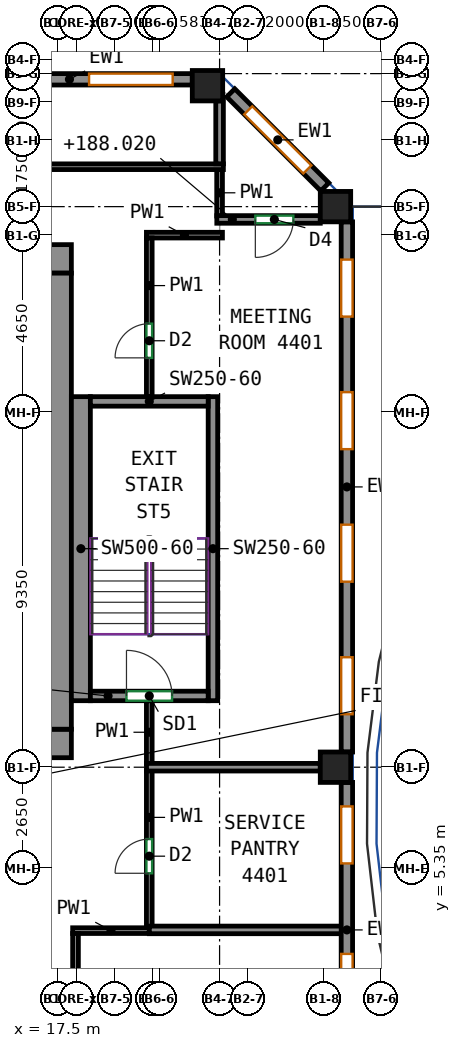
"""IFC4 building model, lengths in metres.
Left out: names, types, materials, properties, quantities, classifications, styles, units other than length and angle.
Written with IfcOpenShell. Run it as: python <this file> out.ifc"""

import sys

from ifc_helpers import new_model, si_unit, direction, frame, frame_2d, origin, origin_2d, place, context, subcontext, project, spatial, rectangle, extrude, source, transform, mapped, element, fill, save


model = new_model("IFC4")
c1 = context("Model", 3, precision=1e-05, world=origin(), true_north=direction((0.0, 1.0)))
c2 = subcontext(c1, "Body", "Model", "MODEL_VIEW")
j1 = project(units=[si_unit("LENGTHUNIT", "METRE"), si_unit("PLANEANGLEUNIT", "RADIAN")], contexts=[c1])
p1 = place(None, origin())
s1 = spatial("IfcSite", under=j1, at=p1, CompositionType="ELEMENT")
p2 = place(p1, origin())
s2 = spatial("IfcBuilding", under=s1, at=p2, CompositionType="ELEMENT")
p3 = place(p2, frame((0.0, 0.0, 185.5)))
s3 = spatial("IfcBuildingStorey", under=s2, at=p3, CompositionType="ELEMENT", Elevation=185.5)
m1 = source(origin(), c2, "Body", "SweptSolid", [
    extrude(rectangle(XDim=0.8, YDim=0.8, at=origin_2d()), origin(), (0.0, 0.0, 1.0), 3.12),
])
for number, where, z_axis, x_axis in (
    (1, (21.432, 25.932, 0.0), (0.0, 0.0, 1.0), (1.0, 0.0, 0.0)),
    (2, (24.8, 8.0, 0.0), (0.0, 0.0, 1.0), (1.0, 0.0, 0.0)),
    (3, (24.8, 22.75, 0.0), (0.0, 0.0, 1.0), (1.0, 0.0, 0.0)),
):
    element("IfcColumn", number, at=place(p3, frame(where, z_axis=z_axis, x_axis=x_axis)), inside=s3, PredefinedType="COLUMN", context=c2, shape_type="MappedRepresentation", body=[
        mapped(m1, transform((0.0, 0.0, 0.0))),
    ])
m2 = source(origin(), c2, "Body", "SweptSolid", [
    extrude(rectangle(XDim=5.38, YDim=0.75, at=frame_2d((2.69, 0.0))), origin(), (0.0, 0.0, 1.0), 3.12),
])
p4 = place(p3, frame((12.47, 8.625, 0.0), z_axis=(0.0, 0.0, 1.0), x_axis=(1.0, 0.0, 0.0)))
e4 = element("IfcWall", 4, at=p4, inside=s3, PredefinedType="SHEAR", context=c2, shape_type="MappedRepresentation", body=[
    mapped(m2, transform((0.0, 0.0, 0.0))),
])
p5 = place(p4, frame((2.18, 0.0, 0.0)))
e5 = element("IfcOpeningElement", 5, at=p5, cuts=e4, PredefinedType="OPENING", context=c2, shape_type="SweptSolid", body=[
    extrude(rectangle(XDim=1.2, YDim=2.1, at=frame_2d((0.6, 1.05))), frame((0.0, 0.385, 0.0), z_axis=(0.0, -1.0, 0.0), x_axis=(1.0, 0.0, 0.0)), (0.0, 0.0, 1.0), 0.77),
])
m3 = source(origin(), c2, "Body", "SweptSolid", [
    extrude(rectangle(XDim=33.6, YDim=0.75, at=frame_2d((16.8, 0.0))), origin(), (0.0, 0.0, 1.0), 3.12),
])
p6 = place(p3, frame((-15.75, 21.375, 0.0), z_axis=(0.0, 0.0, 1.0), x_axis=(1.0, 0.0, 0.0)))
e6 = element("IfcWall", 6, at=p6, inside=s3, PredefinedType="SHEAR", context=c2, shape_type="MappedRepresentation", body=[
    mapped(m3, transform((0.0, 0.0, 0.0))),
])
p7 = place(p6, frame((5.858, 0.0, 0.0)))
e7 = element("IfcOpeningElement", 7, at=p7, cuts=e6, PredefinedType="OPENING", context=c2, shape_type="SweptSolid", body=[
    extrude(rectangle(XDim=0.9, YDim=2.1, at=frame_2d((0.45, 1.05))), frame((0.0, 0.385, 0.0), z_axis=(0.0, -1.0, 0.0), x_axis=(1.0, 0.0, 0.0)), (0.0, 0.0, 1.0), 0.77),
])
p8 = place(p6, frame((10.923, 0.0, 0.0)))
e8 = element("IfcOpeningElement", 8, at=p8, cuts=e6, PredefinedType="OPENING", context=c2, shape_type="SweptSolid", body=[
    extrude(rectangle(XDim=0.9, YDim=2.1, at=frame_2d((0.45, 1.05))), frame((0.0, 0.385, 0.0), z_axis=(0.0, -1.0, 0.0), x_axis=(1.0, 0.0, 0.0)), (0.0, 0.0, 1.0), 0.77),
])
p9 = place(p6, frame((16.055, 0.0, 0.0)))
e9 = element("IfcOpeningElement", 9, at=p9, cuts=e6, PredefinedType="OPENING", context=c2, shape_type="SweptSolid", body=[
    extrude(rectangle(XDim=0.9, YDim=2.1, at=frame_2d((0.45, 1.05))), frame((0.0, 0.385, 0.0), z_axis=(0.0, -1.0, 0.0), x_axis=(1.0, 0.0, 0.0)), (0.0, 0.0, 1.0), 0.77),
])
p10 = place(p6, frame((20.879, 0.0, 0.0)))
e10 = element("IfcOpeningElement", 10, at=p10, cuts=e6, PredefinedType="OPENING", context=c2, shape_type="SweptSolid", body=[
    extrude(rectangle(XDim=0.9, YDim=2.1, at=frame_2d((0.45, 1.05))), frame((0.0, 0.385, 0.0), z_axis=(0.0, -1.0, 0.0), x_axis=(1.0, 0.0, 0.0)), (0.0, 0.0, 1.0), 0.77),
])
p11 = place(p6, frame((26.239, 0.0, 0.0)))
e11 = element("IfcOpeningElement", 11, at=p11, cuts=e6, PredefinedType="OPENING", context=c2, shape_type="SweptSolid", body=[
    extrude(rectangle(XDim=0.9, YDim=2.1, at=frame_2d((0.45, 1.05))), frame((0.0, 0.385, 0.0), z_axis=(0.0, -1.0, 0.0), x_axis=(1.0, 0.0, 0.0)), (0.0, 0.0, 1.0), 0.77),
])
p12 = place(p6, frame((2.275, 0.0, 0.0)))
e12 = element("IfcOpeningElement", 12, at=p12, cuts=e6, PredefinedType="OPENING", context=c2, shape_type="SweptSolid", body=[
    extrude(rectangle(XDim=0.9, YDim=2.1, at=frame_2d((0.45, 1.05))), frame((0.0, 0.385, 0.0), z_axis=(0.0, -1.0, 0.0), x_axis=(1.0, 0.0, 0.0)), (0.0, 0.0, 1.0), 0.77),
])
p13 = place(p6, frame((30.425, 0.0, 0.0)))
e13 = element("IfcOpeningElement", 13, at=p13, cuts=e6, PredefinedType="OPENING", context=c2, shape_type="SweptSolid", body=[
    extrude(rectangle(XDim=0.9, YDim=2.1, at=frame_2d((0.45, 1.05))), frame((0.0, 0.385, 0.0), z_axis=(0.0, -1.0, 0.0), x_axis=(1.0, 0.0, 0.0)), (0.0, 0.0, 1.0), 0.77),
])
m4 = source(origin(), c2, "Body", "SweptSolid", [
    extrude(rectangle(XDim=12.0, YDim=0.75, at=frame_2d((6.0, 0.0))), origin(), (0.0, 0.0, 1.0), 3.12),
])
p14 = place(p3, frame((17.475, 9.0, 0.0), z_axis=(0.0, 0.0, 1.0), x_axis=(0.0, 1.0, 0.0)))
e14 = element("IfcWall", 14, at=p14, inside=s3, PredefinedType="SHEAR", context=c2, shape_type="MappedRepresentation", body=[
    mapped(m4, transform((0.0, 0.0, 0.0))),
])
m5 = source(origin(), c2, "Body", "SweptSolid", [
    extrude(rectangle(XDim=8.0, YDim=0.5, at=frame_2d((4.0, 0.0))), origin(), (0.0, 0.0, 1.0), 3.12),
])
p15 = place(p3, frame((18.1, 9.75, 0.0), z_axis=(0.0, 0.0, 1.0), x_axis=(0.0, 1.0, 0.0)))
e15 = element("IfcWall", 15, at=p15, inside=s3, PredefinedType="SHEAR", context=c2, shape_type="MappedRepresentation", body=[
    mapped(m5, transform((0.0, 0.0, 0.0))),
])
m6 = source(origin(), c2, "Body", "SweptSolid", [
    extrude(rectangle(XDim=8.0, YDim=0.25, at=frame_2d((4.0, 0.0))), origin(), (0.0, 0.0, 1.0), 3.12),
])
p16 = place(p3, frame((21.575, 9.75, 0.0), z_axis=(0.0, 0.0, 1.0), x_axis=(0.0, 1.0, 0.0)))
e16 = element("IfcWall", 16, at=p16, inside=s3, PredefinedType="SHEAR", context=c2, shape_type="MappedRepresentation", body=[
    mapped(m6, transform((0.0, 0.0, 0.0))),
])
m7 = source(origin(), c2, "Body", "SweptSolid", [
    extrude(rectangle(XDim=3.1, YDim=0.25, at=frame_2d((1.55, 0.0))), origin(), (0.0, 0.0, 1.0), 3.12),
])
p17 = place(p3, frame((18.35, 9.875, 0.0), z_axis=(0.0, 0.0, 1.0), x_axis=(1.0, 0.0, 0.0)))
e17 = element("IfcWall", 17, at=p17, inside=s3, PredefinedType="SHEAR", context=c2, shape_type="MappedRepresentation", body=[
    mapped(m7, transform((0.0, 0.0, 0.0))),
])
p18 = place(p17, frame((0.95, 0.0, 0.0)))
e18 = element("IfcOpeningElement", 18, at=p18, cuts=e17, PredefinedType="OPENING", context=c2, shape_type="SweptSolid", body=[
    extrude(rectangle(XDim=1.2, YDim=2.1, at=frame_2d((0.6, 1.05))), frame((0.0, 0.135, 0.0), z_axis=(0.0, -1.0, 0.0), x_axis=(1.0, 0.0, 0.0)), (0.0, 0.0, 1.0), 0.27),
])
p19 = place(p3, frame((18.35, 17.625, 0.0), z_axis=(0.0, 0.0, 1.0), x_axis=(1.0, 0.0, 0.0)))
e19 = element("IfcWall", 19, at=p19, inside=s3, PredefinedType="SHEAR", context=c2, shape_type="MappedRepresentation", body=[
    mapped(m7, transform((0.0, 0.0, 0.0))),
])
m8 = source(origin(), c2, "Body", "SweptSolid", [
    extrude(rectangle(XDim=7.763, YDim=0.3, at=frame_2d((3.881, 0.0))), origin(), (0.0, 0.0, 1.0), 3.12),
])
p20 = place(p3, frame((25.1, -0.163, 0.0), z_axis=(0.0, 0.0, 1.0), x_axis=(0.0, 1.0, 0.0)))
e20 = element("IfcWall", 20, at=p20, inside=s3, PredefinedType="SOLIDWALL", context=c2, shape_type="MappedRepresentation", body=[
    mapped(m8, transform((0.0, 0.0, 0.0))),
])
p21 = place(p20, frame((1.75, 0.0, 0.85)))
e21 = element("IfcOpeningElement", 21, at=p21, cuts=e20, PredefinedType="OPENING", context=c2, shape_type="SweptSolid", body=[
    extrude(rectangle(XDim=1.5, YDim=1.95, at=frame_2d((0.75, 0.975))), frame((0.0, 0.16, 0.0), z_axis=(0.0, -1.0, 0.0), x_axis=(1.0, 0.0, 0.0)), (0.0, 0.0, 1.0), 0.32),
])
p22 = place(p20, frame((5.631, 0.0, 0.85)))
e22 = element("IfcOpeningElement", 22, at=p22, cuts=e20, PredefinedType="OPENING", context=c2, shape_type="SweptSolid", body=[
    extrude(rectangle(XDim=1.5, YDim=1.95, at=frame_2d((0.75, 0.975))), frame((0.0, 0.16, 0.0), z_axis=(0.0, -1.0, 0.0), x_axis=(1.0, 0.0, 0.0)), (0.0, 0.0, 1.0), 0.32),
])
m9 = source(origin(), c2, "Body", "SweptSolid", [
    extrude(rectangle(XDim=13.95, YDim=0.3, at=frame_2d((6.975, 0.0))), origin(), (0.0, 0.0, 1.0), 3.12),
])
p23 = place(p3, frame((25.1, 8.4, 0.0), z_axis=(0.0, 0.0, 1.0), x_axis=(0.0, 1.0, 0.0)))
e23 = element("IfcWall", 23, at=p23, inside=s3, PredefinedType="SOLIDWALL", context=c2, shape_type="MappedRepresentation", body=[
    mapped(m9, transform((0.0, 0.0, 0.0))),
])
p24 = place(p23, frame((0.994, 0.0, 0.85)))
e24 = element("IfcOpeningElement", 24, at=p24, cuts=e23, PredefinedType="OPENING", context=c2, shape_type="SweptSolid", body=[
    extrude(rectangle(XDim=1.5, YDim=1.95, at=frame_2d((0.75, 0.975))), frame((0.0, 0.16, 0.0), z_axis=(0.0, -1.0, 0.0), x_axis=(1.0, 0.0, 0.0)), (0.0, 0.0, 1.0), 0.32),
])
p25 = place(p23, frame((4.481, 0.0, 0.85)))
e25 = element("IfcOpeningElement", 25, at=p25, cuts=e23, PredefinedType="OPENING", context=c2, shape_type="SweptSolid", body=[
    extrude(rectangle(XDim=1.5, YDim=1.95, at=frame_2d((0.75, 0.975))), frame((0.0, 0.16, 0.0), z_axis=(0.0, -1.0, 0.0), x_axis=(1.0, 0.0, 0.0)), (0.0, 0.0, 1.0), 0.32),
])
p26 = place(p23, frame((7.969, 0.0, 0.85)))
e26 = element("IfcOpeningElement", 26, at=p26, cuts=e23, PredefinedType="OPENING", context=c2, shape_type="SweptSolid", body=[
    extrude(rectangle(XDim=1.5, YDim=1.95, at=frame_2d((0.75, 0.975))), frame((0.0, 0.16, 0.0), z_axis=(0.0, -1.0, 0.0), x_axis=(1.0, 0.0, 0.0)), (0.0, 0.0, 1.0), 0.32),
])
p27 = place(p23, frame((11.456, 0.0, 0.85)))
e27 = element("IfcOpeningElement", 27, at=p27, cuts=e23, PredefinedType="OPENING", context=c2, shape_type="SweptSolid", body=[
    extrude(rectangle(XDim=1.5, YDim=1.95, at=frame_2d((0.75, 0.975))), frame((0.0, 0.16, 0.0), z_axis=(0.0, -1.0, 0.0), x_axis=(1.0, 0.0, 0.0)), (0.0, 0.0, 1.0), 0.32),
])
m10 = source(origin(), c2, "Body", "SweptSolid", [
    extrude(rectangle(XDim=3.5, YDim=0.3, at=frame_2d((1.75, 0.0))), origin(), (0.0, 0.0, 1.0), 3.12),
])
p28 = place(p3, frame((24.519, 23.269, 0.0), z_axis=(0.0, 0.0, 1.0), x_axis=(-0.70707190453, 0.707141656123, 0.0)))
e28 = element("IfcWall", 28, at=p28, inside=s3, PredefinedType="SOLIDWALL", context=c2, shape_type="MappedRepresentation", body=[
    mapped(m10, transform((0.0, 0.0, 0.0))),
])
p29 = place(p28, frame((0.65, 0.0, 0.85)))
e29 = element("IfcOpeningElement", 29, at=p29, cuts=e28, PredefinedType="OPENING", context=c2, shape_type="SweptSolid", body=[
    extrude(rectangle(XDim=2.2, YDim=1.95, at=frame_2d((1.1, 0.975))), frame((0.0, 0.16, 0.0), z_axis=(0.0, -1.0, 0.0), x_axis=(1.0, 0.0, 0.0)), (0.0, 0.0, 1.0), 0.32),
])
m11 = source(origin(), c2, "Body", "SweptSolid", [
    extrude(rectangle(XDim=6.465, YDim=0.3, at=frame_2d((3.232, 0.0))), origin(), (0.0, 0.0, 1.0), 3.12),
])
p30 = place(p3, frame((21.032, 26.1, 0.0), z_axis=(0.0, 0.0, 1.0), x_axis=(-1.0, 0.0, 0.0)))
e30 = element("IfcWall", 30, at=p30, inside=s3, PredefinedType="SOLIDWALL", context=c2, shape_type="MappedRepresentation", body=[
    mapped(m11, transform((0.0, 0.0, 0.0))),
])
p31 = place(p30, frame((0.516, 0.0, 0.85)))
e31 = element("IfcOpeningElement", 31, at=p31, cuts=e30, PredefinedType="OPENING", context=c2, shape_type="SweptSolid", body=[
    extrude(rectangle(XDim=2.2, YDim=1.95, at=frame_2d((1.1, 0.975))), frame((0.0, 0.16, 0.0), z_axis=(0.0, -1.0, 0.0), x_axis=(1.0, 0.0, 0.0)), (0.0, 0.0, 1.0), 0.32),
])
p32 = place(p30, frame((3.749, 0.0, 0.85)))
e32 = element("IfcOpeningElement", 32, at=p32, cuts=e30, PredefinedType="OPENING", context=c2, shape_type="SweptSolid", body=[
    extrude(rectangle(XDim=2.2, YDim=1.95, at=frame_2d((1.1, 0.975))), frame((0.0, 0.16, 0.0), z_axis=(0.0, -1.0, 0.0), x_axis=(1.0, 0.0, 0.0)), (0.0, 0.0, 1.0), 0.32),
])
p33 = place(p3, frame((19.9, 3.809, 0.0), z_axis=(0.0, 0.0, 1.0), x_axis=(0.0, 1.0, 0.0)))
e33 = element("IfcWall", 33, at=p33, inside=s3, PredefinedType="PARTITIONING", context=c2, shape_type="SweptSolid", body=[
    extrude(rectangle(XDim=4.101, YDim=0.15, at=frame_2d((2.05, 0.0))), origin(), (0.0, 0.0, 1.0), 3.12),
])
p34 = place(p33, frame((1.4, 0.0, 0.0)))
e34 = element("IfcOpeningElement", 34, at=p34, cuts=e33, PredefinedType="OPENING", context=c2, shape_type="SweptSolid", body=[
    extrude(rectangle(XDim=0.9, YDim=2.1, at=frame_2d((0.45, 1.05))), frame((0.0, 0.085, 0.0), z_axis=(0.0, -1.0, 0.0), x_axis=(1.0, 0.0, 0.0)), (0.0, 0.0, 1.0), 0.17),
])
p35 = place(p3, frame((19.825, 22.0, 0.0), z_axis=(0.0, 0.0, 1.0), x_axis=(1.0, 0.0, 0.0)))
e35 = element("IfcWall", 35, at=p35, inside=s3, PredefinedType="PARTITIONING", context=c2, shape_type="SweptSolid", body=[
    extrude(rectangle(XDim=2.0, YDim=0.15, at=frame_2d((1.0, 0.0))), origin(), (0.0, 0.0, 1.0), 3.12),
])
p36 = place(p3, frame((19.9, 17.75, 0.0), z_axis=(0.0, 0.0, 1.0), x_axis=(0.0, 1.0, 0.0)))
e36 = element("IfcWall", 36, at=p36, inside=s3, PredefinedType="PARTITIONING", context=c2, shape_type="SweptSolid", body=[
    extrude(rectangle(XDim=4.175, YDim=0.15, at=frame_2d((2.087, 0.0))), origin(), (0.0, 0.0, 1.0), 3.12),
])
p37 = place(p36, frame((1.021, 0.0, 0.0)))
e37 = element("IfcOpeningElement", 37, at=p37, cuts=e36, PredefinedType="OPENING", context=c2, shape_type="SweptSolid", body=[
    extrude(rectangle(XDim=0.9, YDim=2.1, at=frame_2d((0.45, 1.05))), frame((0.0, 0.085, 0.0), z_axis=(0.0, -1.0, 0.0), x_axis=(1.0, 0.0, 0.0)), (0.0, 0.0, 1.0), 0.17),
])
p38 = place(p3, frame((19.9, 8.09, 0.0), z_axis=(0.0, 0.0, 1.0), x_axis=(0.0, 1.0, 0.0)))
e38 = element("IfcWall", 38, at=p38, inside=s3, PredefinedType="PARTITIONING", context=c2, shape_type="SweptSolid", body=[
    extrude(rectangle(XDim=1.66, YDim=0.15, at=frame_2d((0.83, 0.0))), origin(), (0.0, 0.0, 1.0), 3.12),
])
p39 = place(p3, frame((21.75, 22.503, 0.0), z_axis=(0.0, 0.0, 1.0), x_axis=(0.0, 1.0, 0.0)))
e39 = element("IfcWall", 39, at=p39, inside=s3, PredefinedType="PARTITIONING", context=c2, shape_type="SweptSolid", body=[
    extrude(rectangle(XDim=1.222, YDim=0.15, at=frame_2d((0.611, 0.0))), origin(), (0.0, 0.0, 1.0), 3.12),
])
p40 = place(p3, frame((17.884, 3.7, 0.0), z_axis=(0.0, 0.0, 1.0), x_axis=(1.0, 0.0, 0.0)))
e40 = element("IfcWall", 40, at=p40, inside=s3, PredefinedType="PARTITIONING", context=c2, shape_type="SweptSolid", body=[
    extrude(rectangle(XDim=2.016, YDim=0.15, at=frame_2d((1.008, 0.0))), origin(), (0.0, 0.0, 1.0), 3.12),
])
p41 = place(p3, frame((17.959, -4.725, 0.0), z_axis=(0.0, 0.0, 1.0), x_axis=(0.0, 1.0, 0.0)))
e41 = element("IfcWall", 41, at=p41, inside=s3, PredefinedType="PARTITIONING", context=c2, shape_type="SweptSolid", body=[
    extrude(rectangle(XDim=8.35, YDim=0.15, at=frame_2d((4.175, 0.0))), origin(), (0.0, 0.0, 1.0), 3.12),
])
p42 = place(p41, frame((4.531, 0.0, 0.0)))
e42 = element("IfcOpeningElement", 42, at=p42, cuts=e41, PredefinedType="OPENING", context=c2, shape_type="SweptSolid", body=[
    extrude(rectangle(XDim=0.9, YDim=2.1, at=frame_2d((0.45, 1.05))), frame((0.0, 0.085, 0.0), z_axis=(0.0, -1.0, 0.0), x_axis=(1.0, 0.0, 0.0)), (0.0, 0.0, 1.0), 0.17),
])
p43 = place(p3, frame((21.85, 23.8, 0.0), z_axis=(0.0, 0.0, 1.0), x_axis=(-1.0, 0.0, 0.0)))
e43 = element("IfcWall", 43, at=p43, inside=s3, PredefinedType="PARTITIONING", context=c2, shape_type="SweptSolid", body=[
    extrude(rectangle(XDim=41.909, YDim=0.15, at=frame_2d((20.955, 0.0))), origin(), (0.0, 0.0, 1.0), 3.12),
])
p44 = place(p43, frame((29.607, 0.0, 0.0)))
e44 = element("IfcOpeningElement", 44, at=p44, cuts=e43, PredefinedType="OPENING", context=c2, shape_type="SweptSolid", body=[
    extrude(rectangle(XDim=1.0, YDim=2.1, at=frame_2d((0.5, 1.05))), frame((0.0, 0.085, 0.0), z_axis=(0.0, -1.0, 0.0), x_axis=(1.0, 0.0, 0.0)), (0.0, 0.0, 1.0), 0.17),
])
p45 = place(p3, frame((19.827, 8.0, 0.0), z_axis=(0.0, 0.0, 1.0), x_axis=(1.0, 0.0, 0.0)))
e45 = element("IfcWall", 45, at=p45, inside=s3, PredefinedType="PARTITIONING", context=c2, shape_type="SweptSolid", body=[
    extrude(rectangle(XDim=4.573, YDim=0.2, at=frame_2d((2.287, 0.0))), origin(), (0.0, 0.0, 1.0), 3.12),
])
p46 = place(p3, frame((19.902, 3.719, 0.0), z_axis=(0.0, 0.0, 1.0), x_axis=(1.0, 0.0, 0.0)))
e46 = element("IfcWall", 46, at=p46, inside=s3, PredefinedType="PARTITIONING", context=c2, shape_type="SweptSolid", body=[
    extrude(rectangle(XDim=5.098, YDim=0.2, at=frame_2d((2.549, 0.0))), origin(), (0.0, 0.0, 1.0), 3.12),
])
p47 = place(p3, frame((24.4, 22.413, 0.0), z_axis=(0.0, 0.0, 1.0), x_axis=(-1.0, 0.0, 0.0)))
e47 = element("IfcWall", 47, at=p47, inside=s3, PredefinedType="PARTITIONING", context=c2, shape_type="SweptSolid", body=[
    extrude(rectangle(XDim=2.723, YDim=0.2, at=frame_2d((1.361, 0.0))), origin(), (0.0, 0.0, 1.0), 2.52),
])
p48 = place(p47, frame((0.709, 0.0, 0.0)))
e48 = element("IfcOpeningElement", 48, at=p48, cuts=e47, PredefinedType="OPENING", context=c2, shape_type="SweptSolid", body=[
    extrude(rectangle(XDim=1.0, YDim=2.1, at=frame_2d((0.5, 1.05))), frame((0.0, 0.11, 0.0), z_axis=(0.0, -1.0, 0.0), x_axis=(1.0, 0.0, 0.0)), (0.0, 0.0, 1.0), 0.22),
])
p49 = place(p3, frame((21.75, 25.532, 0.0), z_axis=(0.0, 0.0, 1.0), x_axis=(0.0, -1.0, 0.0)))
e49 = element("IfcWall", 49, at=p49, inside=s3, PredefinedType="PARTITIONING", context=c2, shape_type="SweptSolid", body=[
    extrude(rectangle(XDim=1.655, YDim=0.2, at=frame_2d((0.828, 0.0))), origin(), (0.0, 0.0, 1.0), 3.12),
])
p50 = place(p21, origin())
e50 = element("IfcWindow", 50, at=p50, inside=s3, PartitioningType="SINGLE_PANEL", PredefinedType="WINDOW", context=c2, shape_type="SweptSolid", body=[
    extrude(rectangle(XDim=1.5, YDim=1.95, at=frame_2d((0.75, 0.975))), frame((0.0, 0.03, 0.0), z_axis=(0.0, -1.0, 0.0), x_axis=(1.0, 0.0, 0.0)), (0.0, 0.0, 1.0), 0.06),
])
fill(e21, e50)
p51 = place(p22, origin())
e51 = element("IfcWindow", 51, at=p51, inside=s3, PartitioningType="SINGLE_PANEL", PredefinedType="WINDOW", context=c2, shape_type="SweptSolid", body=[
    extrude(rectangle(XDim=1.5, YDim=1.95, at=frame_2d((0.75, 0.975))), frame((0.0, 0.03, 0.0), z_axis=(0.0, -1.0, 0.0), x_axis=(1.0, 0.0, 0.0)), (0.0, 0.0, 1.0), 0.06),
])
fill(e22, e51)
p52 = place(p24, origin())
e52 = element("IfcWindow", 52, at=p52, inside=s3, PartitioningType="SINGLE_PANEL", PredefinedType="WINDOW", context=c2, shape_type="SweptSolid", body=[
    extrude(rectangle(XDim=1.5, YDim=1.95, at=frame_2d((0.75, 0.975))), frame((0.0, 0.03, 0.0), z_axis=(0.0, -1.0, 0.0), x_axis=(1.0, 0.0, 0.0)), (0.0, 0.0, 1.0), 0.06),
])
fill(e24, e52)
p53 = place(p25, origin())
e53 = element("IfcWindow", 53, at=p53, inside=s3, PartitioningType="SINGLE_PANEL", PredefinedType="WINDOW", context=c2, shape_type="SweptSolid", body=[
    extrude(rectangle(XDim=1.5, YDim=1.95, at=frame_2d((0.75, 0.975))), frame((0.0, 0.03, 0.0), z_axis=(0.0, -1.0, 0.0), x_axis=(1.0, 0.0, 0.0)), (0.0, 0.0, 1.0), 0.06),
])
fill(e25, e53)
p54 = place(p26, origin())
e54 = element("IfcWindow", 54, at=p54, inside=s3, PartitioningType="SINGLE_PANEL", PredefinedType="WINDOW", context=c2, shape_type="SweptSolid", body=[
    extrude(rectangle(XDim=1.5, YDim=1.95, at=frame_2d((0.75, 0.975))), frame((0.0, 0.03, 0.0), z_axis=(0.0, -1.0, 0.0), x_axis=(1.0, 0.0, 0.0)), (0.0, 0.0, 1.0), 0.06),
])
fill(e26, e54)
p55 = place(p27, origin())
e55 = element("IfcWindow", 55, at=p55, inside=s3, PartitioningType="SINGLE_PANEL", PredefinedType="WINDOW", context=c2, shape_type="SweptSolid", body=[
    extrude(rectangle(XDim=1.5, YDim=1.95, at=frame_2d((0.75, 0.975))), frame((0.0, 0.03, 0.0), z_axis=(0.0, -1.0, 0.0), x_axis=(1.0, 0.0, 0.0)), (0.0, 0.0, 1.0), 0.06),
])
fill(e27, e55)
p56 = place(p29, origin())
e56 = element("IfcWindow", 56, at=p56, inside=s3, PartitioningType="SINGLE_PANEL", PredefinedType="WINDOW", context=c2, shape_type="SweptSolid", body=[
    extrude(rectangle(XDim=2.2, YDim=1.95, at=frame_2d((1.1, 0.975))), frame((0.0, 0.03, 0.0), z_axis=(0.0, -1.0, 0.0), x_axis=(1.0, 0.0, 0.0)), (0.0, 0.0, 1.0), 0.06),
])
fill(e29, e56)
p57 = place(p31, origin())
e57 = element("IfcWindow", 57, at=p57, inside=s3, PartitioningType="SINGLE_PANEL", PredefinedType="WINDOW", context=c2, shape_type="SweptSolid", body=[
    extrude(rectangle(XDim=2.2, YDim=1.95, at=frame_2d((1.1, 0.975))), frame((0.0, 0.03, 0.0), z_axis=(0.0, -1.0, 0.0), x_axis=(1.0, 0.0, 0.0)), (0.0, 0.0, 1.0), 0.06),
])
fill(e31, e57)
p58 = place(p18, origin())
e58 = element("IfcDoor", 58, at=p58, inside=s3, OperationType="DOUBLE_DOOR_SINGLE_SWING", PredefinedType="DOOR", context=c2, shape_type="SweptSolid", body=[
    extrude(rectangle(XDim=1.2, YDim=2.1, at=frame_2d((0.6, 1.05))), frame((0.0, 0.025, 0.0), z_axis=(0.0, -1.0, 0.0), x_axis=(1.0, 0.0, 0.0)), (0.0, 0.0, 1.0), 0.05),
])
fill(e18, e58)
p59 = place(p34, origin())
e59 = element("IfcDoor", 59, at=p59, inside=s3, OperationType="SINGLE_SWING_LEFT", PredefinedType="DOOR", context=c2, shape_type="SweptSolid", body=[
    extrude(rectangle(XDim=0.9, YDim=2.1, at=frame_2d((0.45, 1.05))), frame((0.0, 0.025, 0.0), z_axis=(0.0, -1.0, 0.0), x_axis=(1.0, 0.0, 0.0)), (0.0, 0.0, 1.0), 0.05),
])
fill(e34, e59)
p60 = place(p37, origin())
e60 = element("IfcDoor", 60, at=p60, inside=s3, OperationType="SINGLE_SWING_LEFT", PredefinedType="DOOR", context=c2, shape_type="SweptSolid", body=[
    extrude(rectangle(XDim=0.9, YDim=2.1, at=frame_2d((0.45, 1.05))), frame((0.0, 0.025, 0.0), z_axis=(0.0, -1.0, 0.0), x_axis=(1.0, 0.0, 0.0)), (0.0, 0.0, 1.0), 0.05),
])
fill(e37, e60)
p61 = place(p48, origin())
e61 = element("IfcDoor", 61, at=p61, inside=s3, OperationType="SINGLE_SWING_RIGHT", PredefinedType="DOOR", context=c2, shape_type="SweptSolid", body=[
    extrude(rectangle(XDim=1.0, YDim=2.1, at=frame_2d((0.5, 1.05))), frame((0.0, 0.025, 0.0), z_axis=(0.0, -1.0, 0.0), x_axis=(1.0, 0.0, 0.0)), (0.0, 0.0, 1.0), 0.05),
])
fill(e48, e61)
save(model, sys.argv[1])
